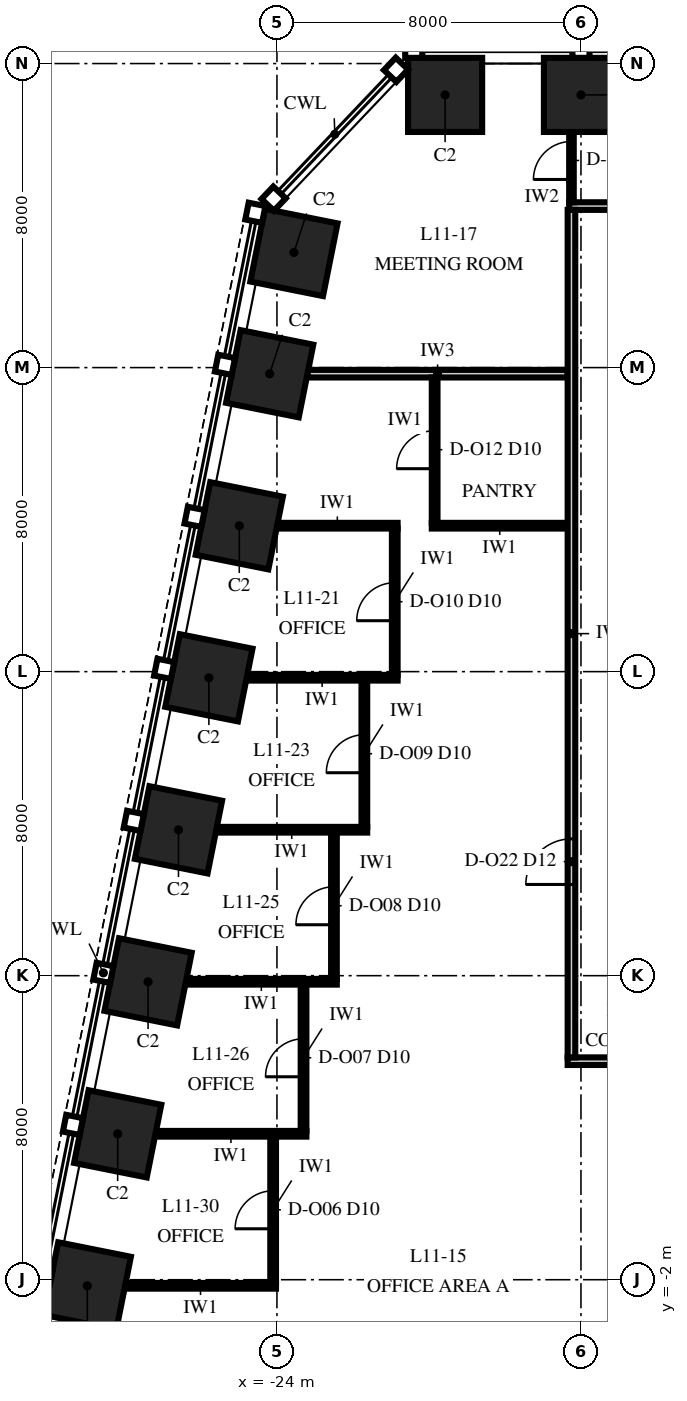
"""IFC4 building model, lengths in metres.
Left out: names, types, materials, properties, quantities, classifications, styles, units other than length and angle.
Written with IfcOpenShell. Run it as: python <this file> out.ifc"""

import sys

from ifc_helpers import new_model, si_unit, direction, frame, frame_2d, origin, origin_2d, place, context, subcontext, project, spatial, rectangle, extrude, element, fill, save


model = new_model("IFC4")
c1 = context("Model", 3, precision=1e-05, world=origin(), true_north=direction((0.0, 1.0)))
c2 = subcontext(c1, "Body", "Model", "MODEL_VIEW")
j1 = project(units=[si_unit("LENGTHUNIT", "METRE"), si_unit("PLANEANGLEUNIT", "RADIAN")], contexts=[c1])
p1 = place(None, origin())
s1 = spatial("IfcSite", under=j1, at=p1, CompositionType="ELEMENT")
p2 = place(p1, origin())
s2 = spatial("IfcBuilding", under=s1, at=p2, CompositionType="ELEMENT")
p3 = place(p2, frame((0.0, 0.0, 56.0)))
s3 = spatial("IfcBuildingStorey", under=s2, at=p3, CompositionType="ELEMENT", Elevation=56.0)
for number, where, z_axis, x_axis in (
    (1, (-16.0, 29.175, 0.0), (0.0, 0.0, 1.0), (-1.0, 0.0, 0.0)),
    (2, (-19.575, 29.175, 0.0), (0.0, 0.0, 1.0), (-1.0, 0.0, 0.0)),
    (3, (-23.553, 25.029, 0.0), (0.0, 0.0, 1.0), (-0.196, -0.981, 0.0)),
    (4, (-24.191, 21.838, 0.0), (0.0, 0.0, 1.0), (-0.196, -0.981, 0.0)),
    (5, (-24.991, 17.838, 0.0), (0.0, 0.0, 1.0), (-0.196, -0.981, 0.0)),
    (6, (-25.791, 13.838, 0.0), (0.0, 0.0, 1.0), (-0.196, -0.981, 0.0)),
    (7, (-26.591, 9.838, 0.0), (0.0, 0.0, 1.0), (-0.196, -0.981, 0.0)),
    (8, (-27.391, 5.838, 0.0), (0.0, 0.0, 1.0), (-0.196, -0.981, 0.0)),
    (9, (-28.191, 1.838, 0.0), (0.0, 0.0, 1.0), (-0.196, -0.981, 0.0)),
    (10, (-28.991, -2.162, 0.0), (0.0, 0.0, 1.0), (-0.196, -0.981, 0.0)),
):
    element("IfcColumn", number, at=place(p3, frame(where, z_axis=z_axis, x_axis=x_axis)), inside=s3, PredefinedType="COLUMN", context=c2, shape_type="SweptSolid", body=[
        extrude(rectangle(XDim=1.95, YDim=1.95, at=origin_2d()), origin(), (0.0, 0.0, 1.0), 4.0),
    ])
p4 = place(p3, frame((-27.996, -2.16, 0.0), z_axis=(0.0, 0.0, 1.0), x_axis=(1.0, 0.0, 0.0)))
e11 = element("IfcWall", 11, at=p4, inside=s3, PredefinedType="PARTITIONING", context=c2, shape_type="SweptSolid", body=[
    extrude(rectangle(XDim=3.971, YDim=0.15, at=frame_2d((1.986, 0.0))), origin(), (0.0, 0.0, 1.0), 3.25),
])
p5 = place(p3, frame((-27.196, 1.84, 0.0), z_axis=(0.0, 0.0, 1.0), x_axis=(1.0, 0.0, 0.0)))
e12 = element("IfcWall", 12, at=p5, inside=s3, PredefinedType="PARTITIONING", context=c2, shape_type="SweptSolid", body=[
    extrude(rectangle(XDim=3.971, YDim=0.15, at=frame_2d((1.986, 0.0))), origin(), (0.0, 0.0, 1.0), 3.25),
])
p6 = place(p3, frame((-16.35, 3.75, 0.0), z_axis=(0.0, 0.0, 1.0), x_axis=(1.0, 0.0, 0.0)))
e13 = element("IfcWall", 13, at=p6, inside=s3, PredefinedType="PARTITIONING", context=c2, shape_type="SweptSolid", body=[
    extrude(rectangle(XDim=32.7, YDim=0.2, at=frame_2d((16.35, 0.0))), origin(), (0.0, 0.0, 1.0), 3.25),
])
p7 = place(p6, frame((15.75, 0.0, 0.0)))
e14 = element("IfcOpeningElement", 14, at=p7, cuts=e13, PredefinedType="OPENING", context=c2, shape_type="SweptSolid", body=[
    extrude(rectangle(XDim=1.2, YDim=2.4, at=frame_2d((0.6, 1.2))), frame((0.0, 0.115, 0.0), z_axis=(0.0, -1.0, 0.0), x_axis=(1.0, 0.0, 0.0)), (0.0, 0.0, 1.0), 0.23),
])
p8 = place(p3, frame((-26.396, 5.84, 0.0), z_axis=(0.0, 0.0, 1.0), x_axis=(1.0, 0.0, 0.0)))
e15 = element("IfcWall", 15, at=p8, inside=s3, PredefinedType="PARTITIONING", context=c2, shape_type="SweptSolid", body=[
    extrude(rectangle(XDim=3.971, YDim=0.15, at=frame_2d((1.986, 0.0))), origin(), (0.0, 0.0, 1.0), 2.842),
])
for number, where, z_axis, x_axis in (
    (16, (-25.596, 9.84, 0.0), (0.0, 0.0, 1.0), (1.0, 0.0, 0.0)),
    (17, (-24.796, 13.84, 0.0), (0.0, 0.0, 1.0), (1.0, 0.0, 0.0)),
):
    element("IfcWall", number, at=place(p3, frame(where, z_axis=z_axis, x_axis=x_axis)), inside=s3, PredefinedType="PARTITIONING", context=c2, shape_type="SweptSolid", body=[
        extrude(rectangle(XDim=3.971, YDim=0.15, at=frame_2d((1.986, 0.0))), origin(), (0.0, 0.0, 1.0), 3.25),
    ])
p9 = place(p3, frame((-23.996, 17.84, 0.0), z_axis=(0.0, 0.0, 1.0), x_axis=(1.0, 0.0, 0.0)))
e18 = element("IfcWall", 18, at=p9, inside=s3, PredefinedType="PARTITIONING", context=c2, shape_type="SweptSolid", body=[
    extrude(rectangle(XDim=3.171, YDim=0.15, at=frame_2d((1.586, 0.0))), origin(), (0.0, 0.0, 1.0), 3.25),
])
p10 = place(p3, frame((-19.925, 17.84, 0.0), z_axis=(0.0, 0.0, 1.0), x_axis=(1.0, 0.0, 0.0)))
e19 = element("IfcWall", 19, at=p10, inside=s3, PredefinedType="PARTITIONING", context=c2, shape_type="SweptSolid", body=[
    extrude(rectangle(XDim=3.575, YDim=0.15, at=frame_2d((1.788, 0.0))), origin(), (0.0, 0.0, 1.0), 3.25),
])
p11 = place(p3, frame((-23.196, 21.84, 0.0), z_axis=(0.0, 0.0, 1.0), x_axis=(1.0, 0.0, 0.0)))
e20 = element("IfcWall", 20, at=p11, inside=s3, PredefinedType="PARTITIONING", context=c2, shape_type="SweptSolid", body=[
    extrude(rectangle(XDim=6.846, YDim=0.2, at=frame_2d((3.423, 0.0))), origin(), (0.0, 0.0, 1.0), 3.25),
])
p12 = place(p3, frame((-16.31, 26.25, 0.0), z_axis=(0.0, 0.0, 1.0), x_axis=(1.0, 0.0, 0.0)))
e21 = element("IfcWall", 21, at=p12, inside=s3, PredefinedType="PARTITIONING", context=c2, shape_type="SweptSolid", body=[
    extrude(rectangle(XDim=32.635, YDim=0.2, at=frame_2d((16.317, 0.0))), origin(), (0.0, 0.0, 1.0), 3.4),
])
p13 = place(p12, frame((15.71, 0.0, 0.0)))
e22 = element("IfcOpeningElement", 22, at=p13, cuts=e21, PredefinedType="OPENING", context=c2, shape_type="SweptSolid", body=[
    extrude(rectangle(XDim=1.2, YDim=2.4, at=frame_2d((0.6, 1.2))), frame((0.0, 0.115, 0.0), z_axis=(0.0, -1.0, 0.0), x_axis=(1.0, 0.0, 0.0)), (0.0, 0.0, 1.0), 0.23),
])
p14 = place(p3, frame((-24.1, -2.085, 0.0), z_axis=(0.0, 0.0, 1.0), x_axis=(0.0, 1.0, 0.0)))
e23 = element("IfcWall", 23, at=p14, inside=s3, PredefinedType="PARTITIONING", context=c2, shape_type="SweptSolid", body=[
    extrude(rectangle(XDim=3.85, YDim=0.15, at=frame_2d((1.925, 0.0))), origin(), (0.0, 0.0, 1.0), 3.85),
])
p15 = place(p14, frame((1.425, 0.0, 0.0)))
e24 = element("IfcOpeningElement", 24, at=p15, cuts=e23, PredefinedType="OPENING", context=c2, shape_type="SweptSolid", body=[
    extrude(rectangle(XDim=1.0, YDim=2.3, at=frame_2d((0.5, 1.15))), frame((0.0, 0.09, 0.0), z_axis=(0.0, -1.0, 0.0), x_axis=(1.0, 0.0, 0.0)), (0.0, 0.0, 1.0), 0.18),
])
p16 = place(p3, frame((-23.3, 1.915, 0.0), z_axis=(0.0, 0.0, 1.0), x_axis=(0.0, 1.0, 0.0)))
e25 = element("IfcWall", 25, at=p16, inside=s3, PredefinedType="PARTITIONING", context=c2, shape_type="SweptSolid", body=[
    extrude(rectangle(XDim=3.85, YDim=0.15, at=frame_2d((1.925, 0.0))), origin(), (0.0, 0.0, 1.0), 3.85),
])
p17 = place(p16, frame((1.425, 0.0, 0.0)))
e26 = element("IfcOpeningElement", 26, at=p17, cuts=e25, PredefinedType="OPENING", context=c2, shape_type="SweptSolid", body=[
    extrude(rectangle(XDim=1.0, YDim=2.3, at=frame_2d((0.5, 1.15))), frame((0.0, 0.09, 0.0), z_axis=(0.0, -1.0, 0.0), x_axis=(1.0, 0.0, 0.0)), (0.0, 0.0, 1.0), 0.18),
])
p18 = place(p3, frame((-22.5, 5.915, 0.0), z_axis=(0.0, 0.0, 1.0), x_axis=(0.0, 1.0, 0.0)))
e27 = element("IfcWall", 27, at=p18, inside=s3, PredefinedType="PARTITIONING", context=c2, shape_type="SweptSolid", body=[
    extrude(rectangle(XDim=3.85, YDim=0.15, at=frame_2d((1.925, 0.0))), origin(), (0.0, 0.0, 1.0), 2.842),
])
p19 = place(p18, frame((1.425, 0.0, 0.0)))
e28 = element("IfcOpeningElement", 28, at=p19, cuts=e27, PredefinedType="OPENING", context=c2, shape_type="SweptSolid", body=[
    extrude(rectangle(XDim=1.0, YDim=2.3, at=frame_2d((0.5, 1.15))), frame((0.0, 0.09, 0.0), z_axis=(0.0, -1.0, 0.0), x_axis=(1.0, 0.0, 0.0)), (0.0, 0.0, 1.0), 0.18),
])
p20 = place(p3, frame((-21.7, 9.915, 0.0), z_axis=(0.0, 0.0, 1.0), x_axis=(0.0, 1.0, 0.0)))
e29 = element("IfcWall", 29, at=p20, inside=s3, PredefinedType="PARTITIONING", context=c2, shape_type="SweptSolid", body=[
    extrude(rectangle(XDim=3.85, YDim=0.15, at=frame_2d((1.925, 0.0))), origin(), (0.0, 0.0, 1.0), 3.85),
])
p21 = place(p20, frame((1.425, 0.0, 0.0)))
e30 = element("IfcOpeningElement", 30, at=p21, cuts=e29, PredefinedType="OPENING", context=c2, shape_type="SweptSolid", body=[
    extrude(rectangle(XDim=1.0, YDim=2.3, at=frame_2d((0.5, 1.15))), frame((0.0, 0.09, 0.0), z_axis=(0.0, -1.0, 0.0), x_axis=(1.0, 0.0, 0.0)), (0.0, 0.0, 1.0), 0.18),
])
p22 = place(p3, frame((-20.9, 13.915, 0.0), z_axis=(0.0, 0.0, 1.0), x_axis=(0.0, 1.0, 0.0)))
e31 = element("IfcWall", 31, at=p22, inside=s3, PredefinedType="PARTITIONING", context=c2, shape_type="SweptSolid", body=[
    extrude(rectangle(XDim=3.85, YDim=0.15, at=frame_2d((1.925, 0.0))), origin(), (0.0, 0.0, 1.0), 3.25),
])
p23 = place(p22, frame((1.425, 0.0, 0.0)))
e32 = element("IfcOpeningElement", 32, at=p23, cuts=e31, PredefinedType="OPENING", context=c2, shape_type="SweptSolid", body=[
    extrude(rectangle(XDim=1.0, YDim=2.3, at=frame_2d((0.5, 1.15))), frame((0.0, 0.09, 0.0), z_axis=(0.0, -1.0, 0.0), x_axis=(1.0, 0.0, 0.0)), (0.0, 0.0, 1.0), 0.18),
])
p24 = place(p3, frame((-19.85, 17.915, 0.0), z_axis=(0.0, 0.0, 1.0), x_axis=(0.0, 1.0, 0.0)))
e33 = element("IfcWall", 33, at=p24, inside=s3, PredefinedType="PARTITIONING", context=c2, shape_type="SweptSolid", body=[
    extrude(rectangle(XDim=3.825, YDim=0.15, at=frame_2d((1.913, 0.0))), origin(), (0.0, 0.0, 1.0), 3.25),
])
p25 = place(p24, frame((1.425, 0.0, 0.0)))
e34 = element("IfcOpeningElement", 34, at=p25, cuts=e33, PredefinedType="OPENING", context=c2, shape_type="SweptSolid", body=[
    extrude(rectangle(XDim=1.0, YDim=2.3, at=frame_2d((0.5, 1.15))), frame((0.0, 0.09, 0.0), z_axis=(0.0, -1.0, 0.0), x_axis=(1.0, 0.0, 0.0)), (0.0, 0.0, 1.0), 0.18),
])
p26 = place(p3, frame((-16.25, 3.85, 0.0), z_axis=(0.0, 0.0, 1.0), x_axis=(0.0, 1.0, 0.0)))
e35 = element("IfcWall", 35, at=p26, inside=s3, PredefinedType="PARTITIONING", context=c2, shape_type="SweptSolid", body=[
    extrude(rectangle(XDim=22.3, YDim=0.2, at=frame_2d((11.15, 0.0))), origin(), (0.0, 0.0, 1.0), 2.842),
])
p27 = place(p26, frame((4.55, 0.0, 0.0)))
e36 = element("IfcOpeningElement", 36, at=p27, cuts=e35, PredefinedType="OPENING", context=c2, shape_type="SweptSolid", body=[
    extrude(rectangle(XDim=1.2, YDim=2.4, at=frame_2d((0.6, 1.2))), frame((0.0, 0.115, 0.0), z_axis=(0.0, -1.0, 0.0), x_axis=(1.0, 0.0, 0.0)), (0.0, 0.0, 1.0), 0.23),
])
p28 = place(p3, frame((-16.25, 26.35, 0.0), z_axis=(0.0, 0.0, 1.0), x_axis=(0.0, 1.0, 0.0)))
e37 = element("IfcWall", 37, at=p28, inside=s3, PredefinedType="PARTITIONING", context=c2, shape_type="SweptSolid", body=[
    extrude(rectangle(XDim=1.85, YDim=0.12, at=frame_2d((0.925, 0.0))), origin(), (0.0, 0.0, 1.0), 3.85),
])
p29 = place(p28, frame((0.6, 0.0, 0.0)))
e38 = element("IfcOpeningElement", 38, at=p29, cuts=e37, PredefinedType="OPENING", context=c2, shape_type="SweptSolid", body=[
    extrude(rectangle(XDim=1.0, YDim=2.4, at=frame_2d((0.5, 1.2))), frame((0.0, 0.075, 0.0), z_axis=(0.0, -1.0, 0.0), x_axis=(1.0, 0.0, 0.0)), (0.0, 0.0, 1.0), 0.15),
])
p30 = place(p15, origin())
e39 = element("IfcDoor", 39, at=p30, inside=s3, OperationType="SINGLE_SWING_LEFT", PredefinedType="DOOR", context=c2, shape_type="SweptSolid", body=[
    extrude(rectangle(XDim=1.0, YDim=2.3, at=frame_2d((0.5, 1.15))), frame((0.0, 0.075, 0.0), z_axis=(0.0, -1.0, 0.0), x_axis=(1.0, 0.0, 0.0)), (0.0, 0.0, 1.0), 0.149),
])
fill(e24, e39)
p31 = place(p17, origin())
e40 = element("IfcDoor", 40, at=p31, inside=s3, OperationType="SINGLE_SWING_LEFT", PredefinedType="DOOR", context=c2, shape_type="SweptSolid", body=[
    extrude(rectangle(XDim=1.0, YDim=2.3, at=frame_2d((0.5, 1.15))), frame((0.0, 0.075, 0.0), z_axis=(0.0, -1.0, 0.0), x_axis=(1.0, 0.0, 0.0)), (0.0, 0.0, 1.0), 0.149),
])
fill(e26, e40)
p32 = place(p19, origin())
e41 = element("IfcDoor", 41, at=p32, inside=s3, OperationType="SINGLE_SWING_LEFT", PredefinedType="DOOR", context=c2, shape_type="SweptSolid", body=[
    extrude(rectangle(XDim=1.0, YDim=2.3, at=frame_2d((0.5, 1.15))), frame((0.0, 0.075, 0.0), z_axis=(0.0, -1.0, 0.0), x_axis=(1.0, 0.0, 0.0)), (0.0, 0.0, 1.0), 0.149),
])
fill(e28, e41)
p33 = place(p21, origin())
e42 = element("IfcDoor", 42, at=p33, inside=s3, OperationType="SINGLE_SWING_LEFT", PredefinedType="DOOR", context=c2, shape_type="SweptSolid", body=[
    extrude(rectangle(XDim=1.0, YDim=2.3, at=frame_2d((0.5, 1.15))), frame((0.0, 0.075, 0.0), z_axis=(0.0, -1.0, 0.0), x_axis=(1.0, 0.0, 0.0)), (0.0, 0.0, 1.0), 0.149),
])
fill(e30, e42)
p34 = place(p23, origin())
e43 = element("IfcDoor", 43, at=p34, inside=s3, OperationType="SINGLE_SWING_LEFT", PredefinedType="DOOR", context=c2, shape_type="SweptSolid", body=[
    extrude(rectangle(XDim=1.0, YDim=2.3, at=frame_2d((0.5, 1.15))), frame((0.0, 0.075, 0.0), z_axis=(0.0, -1.0, 0.0), x_axis=(1.0, 0.0, 0.0)), (0.0, 0.0, 1.0), 0.149),
])
fill(e32, e43)
p35 = place(p25, origin())
e44 = element("IfcDoor", 44, at=p35, inside=s3, OperationType="SINGLE_SWING_LEFT", PredefinedType="DOOR", context=c2, shape_type="SweptSolid", body=[
    extrude(rectangle(XDim=1.0, YDim=2.3, at=frame_2d((0.5, 1.15))), frame((0.0, 0.075, 0.0), z_axis=(0.0, -1.0, 0.0), x_axis=(1.0, 0.0, 0.0)), (0.0, 0.0, 1.0), 0.149),
])
fill(e34, e44)
p36 = place(p29, origin())
e45 = element("IfcDoor", 45, at=p36, inside=s3, OperationType="SINGLE_SWING_RIGHT", PredefinedType="DOOR", context=c2, shape_type="SweptSolid", body=[
    extrude(rectangle(XDim=1.0, YDim=2.4, at=frame_2d((0.5, 1.2))), frame((0.0, 0.06, 0.0), z_axis=(0.0, -1.0, 0.0), x_axis=(1.0, 0.0, 0.0)), (0.0, 0.0, 1.0), 0.12),
])
fill(e38, e45)
p37 = place(p27, origin())
e46 = element("IfcDoor", 46, at=p37, inside=s3, OperationType="SINGLE_SWING_LEFT", PredefinedType="DOOR", context=c2, shape_type="SweptSolid", body=[
    extrude(rectangle(XDim=1.2, YDim=2.4, at=frame_2d((0.6, 1.2))), frame((0.0, 0.1, 0.0), z_axis=(0.0, -1.0, 0.0), x_axis=(1.0, 0.0, 0.0)), (0.0, 0.0, 1.0), 0.199),
])
fill(e36, e46)
save(model, sys.argv[1])
